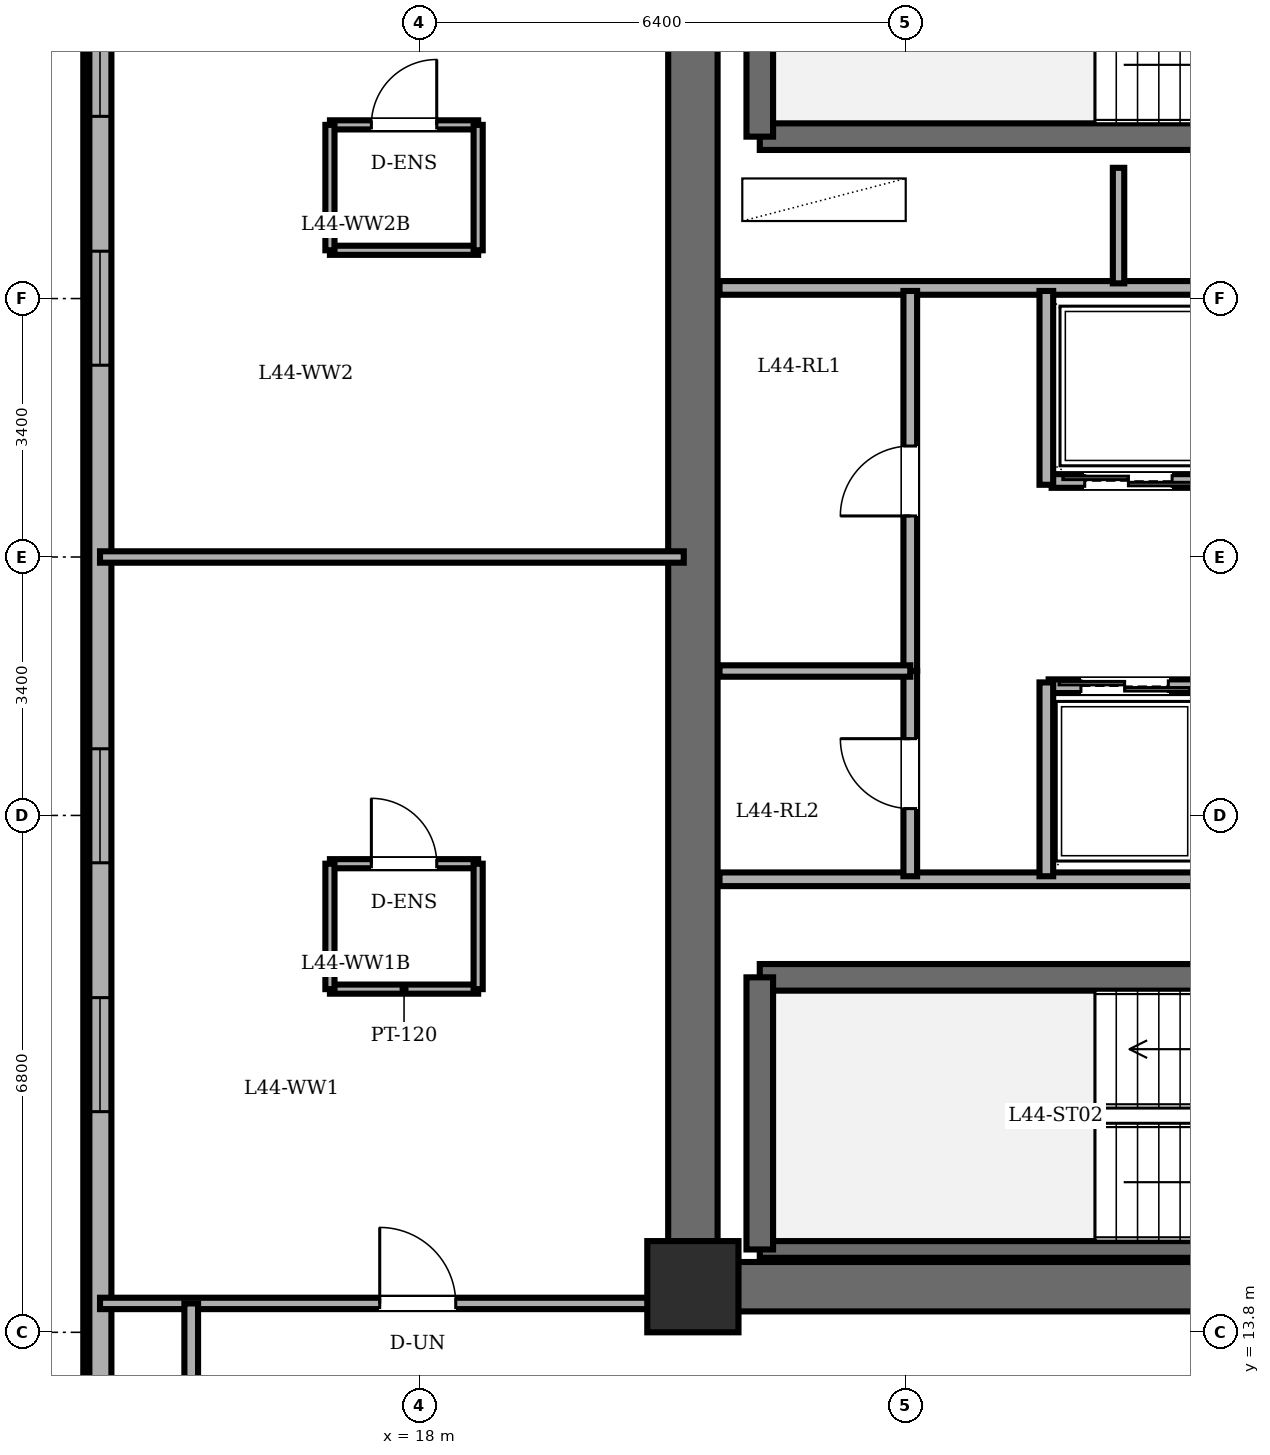
"""IFC4 building model, lengths in metres.
Left out: names, types, materials, properties, quantities, classifications, styles, units other than length and angle.
Written with IfcOpenShell. Run it as: python <this file> out.ifc"""

import sys

from ifc_helpers import new_model, si_unit, direction, frame, frame_2d, origin, origin_2d, place, context, subcontext, project, spatial, rectangle, extrude, element, fill, save


model = new_model("IFC4")
c1 = context("Model", 3, precision=1e-05, world=origin(), true_north=direction((0.0, 1.0)))
c2 = subcontext(c1, "Body", "Model", "MODEL_VIEW")
j1 = project(units=[si_unit("LENGTHUNIT", "METRE"), si_unit("PLANEANGLEUNIT", "RADIAN")], contexts=[c1])
p1 = place(None, origin())
s1 = spatial("IfcSite", under=j1, at=p1, CompositionType="ELEMENT")
p2 = place(p1, origin())
s2 = spatial("IfcBuilding", under=s1, at=p2, CompositionType="ELEMENT")
p3 = place(p2, frame((0.0, 0.0, 169.0)))
s3 = spatial("IfcBuildingStorey", under=s2, at=p3, CompositionType="ELEMENT", Elevation=169.0)
p4 = place(p3, frame((21.6, 14.4, 0.0), z_axis=(0.0, 0.0, 1.0), x_axis=(1.0, 0.0, 0.0)))
e1 = element("IfcColumn", 1, at=p4, inside=s3, PredefinedType="COLUMN", context=c2, shape_type="SweptSolid", body=[
    extrude(rectangle(XDim=1.2, YDim=1.2, at=origin_2d()), origin(), (0.0, 0.0, 1.0), 3.6),
])
p5 = place(p3, frame((13.8, 36.3, 0.0), z_axis=(0.0, 0.0, 1.0), x_axis=(0.0, -1.0, 0.0)))
e2 = element("IfcWall", 2, at=p5, inside=s3, PredefinedType="SOLIDWALL", context=c2, shape_type="SweptSolid", body=[
    extrude(rectangle(XDim=24.6, YDim=0.3, at=frame_2d((12.3, 0.0))), origin(), (0.0, 0.0, 1.0), 3.4),
])
p6 = place(p5, frame((5.003, 0.0, 0.85)))
e3 = element("IfcOpeningElement", 3, at=p6, cuts=e2, PredefinedType="OPENING", context=c2, shape_type="SweptSolid", body=[
    extrude(rectangle(XDim=1.5, YDim=1.55, at=frame_2d((0.75, 0.775))), frame((0.0, 0.16, 0.0), z_axis=(0.0, -1.0, 0.0), x_axis=(1.0, 0.0, 0.0)), (0.0, 0.0, 1.0), 0.32),
])
p7 = place(p5, frame((8.277, 0.0, 0.85)))
e4 = element("IfcOpeningElement", 4, at=p7, cuts=e2, PredefinedType="OPENING", context=c2, shape_type="SweptSolid", body=[
    extrude(rectangle(XDim=1.5, YDim=1.55, at=frame_2d((0.75, 0.775))), frame((0.0, 0.16, 0.0), z_axis=(0.0, -1.0, 0.0), x_axis=(1.0, 0.0, 0.0)), (0.0, 0.0, 1.0), 0.32),
])
p8 = place(p5, frame((14.823, 0.0, 0.85)))
e5 = element("IfcOpeningElement", 5, at=p8, cuts=e2, PredefinedType="OPENING", context=c2, shape_type="SweptSolid", body=[
    extrude(rectangle(XDim=1.5, YDim=1.55, at=frame_2d((0.75, 0.775))), frame((0.0, 0.16, 0.0), z_axis=(0.0, -1.0, 0.0), x_axis=(1.0, 0.0, 0.0)), (0.0, 0.0, 1.0), 0.32),
])
p9 = place(p5, frame((18.097, 0.0, 0.85)))
e6 = element("IfcOpeningElement", 6, at=p9, cuts=e2, PredefinedType="OPENING", context=c2, shape_type="SweptSolid", body=[
    extrude(rectangle(XDim=1.5, YDim=1.55, at=frame_2d((0.75, 0.775))), frame((0.0, 0.16, 0.0), z_axis=(0.0, -1.0, 0.0), x_axis=(1.0, 0.0, 0.0)), (0.0, 0.0, 1.0), 0.32),
])
p10 = place(p3, frame((21.6, 14.4, 0.0), z_axis=(0.0, 0.0, 1.0), x_axis=(0.0, 1.0, 0.0)))
e7 = element("IfcWall", 7, at=p10, inside=s3, PredefinedType="SHEAR", context=c2, shape_type="SweptSolid", body=[
    extrude(rectangle(XDim=19.2, YDim=0.65, at=frame_2d((9.6, 0.0))), origin(), (0.0, 0.0, 1.0), 3.4),
])
p11 = place(p3, frame((37.2, 14.4, 0.0), z_axis=(0.0, 0.0, 1.0), x_axis=(-1.0, 0.0, 0.0)))
e8 = element("IfcWall", 8, at=p11, inside=s3, PredefinedType="SHEAR", context=c2, shape_type="SweptSolid", body=[
    extrude(rectangle(XDim=15.6, YDim=0.65, at=frame_2d((7.8, 0.0))), origin(), (0.0, 0.0, 1.0), 3.4),
])
p12 = place(p3, frame((22.48, 29.53, 0.0), z_axis=(0.0, 0.0, 1.0), x_axis=(1.0, 0.0, 0.0)))
e9 = element("IfcWall", 9, at=p12, inside=s3, PredefinedType="SOLIDWALL", context=c2, shape_type="SweptSolid", body=[
    extrude(rectangle(XDim=7.79, YDim=0.35, at=frame_2d((3.895, 0.0))), origin(), (0.0, 0.0, 1.0), 3.4),
])
p13 = place(p3, frame((22.48, 29.53, 0.0), z_axis=(0.0, 0.0, 1.0), x_axis=(0.0, 1.0, 0.0)))
e10 = element("IfcWall", 10, at=p13, inside=s3, PredefinedType="SOLIDWALL", context=c2, shape_type="SweptSolid", body=[
    extrude(rectangle(XDim=3.58, YDim=0.35, at=frame_2d((1.79, 0.0))), origin(), (0.0, 0.0, 1.0), 3.4),
])
p14 = place(p3, frame((22.48, 18.47, 0.0), z_axis=(0.0, 0.0, 1.0), x_axis=(1.0, 0.0, 0.0)))
e11 = element("IfcWall", 11, at=p14, inside=s3, PredefinedType="SOLIDWALL", context=c2, shape_type="SweptSolid", body=[
    extrude(rectangle(XDim=7.79, YDim=0.35, at=frame_2d((3.895, 0.0))), origin(), (0.0, 0.0, 1.0), 3.4),
])
p15 = place(p3, frame((22.48, 14.89, 0.0), z_axis=(0.0, 0.0, 1.0), x_axis=(1.0, 0.0, 0.0)))
e12 = element("IfcWall", 12, at=p15, inside=s3, PredefinedType="PARTITIONING", context=c2, shape_type="SweptSolid", body=[
    extrude(rectangle(XDim=7.79, YDim=0.22, at=frame_2d((3.895, 0.0))), origin(), (0.0, 0.0, 1.0), 3.4),
])
p16 = place(p3, frame((22.48, 14.89, 0.0), z_axis=(0.0, 0.0, 1.0), x_axis=(0.0, 1.0, 0.0)))
e13 = element("IfcWall", 13, at=p16, inside=s3, PredefinedType="SOLIDWALL", context=c2, shape_type="SweptSolid", body=[
    extrude(rectangle(XDim=3.58, YDim=0.35, at=frame_2d((1.79, 0.0))), origin(), (0.0, 0.0, 1.0), 3.4),
])
p17 = place(p3, frame((21.95, 27.54, 0.0), z_axis=(0.0, 0.0, 1.0), x_axis=(1.0, 0.0, 0.0)))
e14 = element("IfcWall", 14, at=p17, inside=s3, PredefinedType="PARTITIONING", context=c2, shape_type="SweptSolid", body=[
    extrude(rectangle(XDim=10.56, YDim=0.18, at=frame_2d((5.28, 0.0))), origin(), (0.0, 0.0, 1.0), 3.4),
])
p18 = place(p3, frame((27.2, 27.6, 0.0), z_axis=(0.0, 0.0, 1.0), x_axis=(0.0, 1.0, 0.0)))
e15 = element("IfcWall", 15, at=p18, inside=s3, PredefinedType="PARTITIONING", context=c2, shape_type="SweptSolid", body=[
    extrude(rectangle(XDim=1.52, YDim=0.15, at=frame_2d((0.76, 0.0))), origin(), (0.0, 0.0, 1.0), 3.4),
])
p19 = place(p3, frame((21.95, 19.76, 0.0), z_axis=(0.0, 0.0, 1.0), x_axis=(1.0, 0.0, 0.0)))
e16 = element("IfcWall", 16, at=p19, inside=s3, PredefinedType="PARTITIONING", context=c2, shape_type="SweptSolid", body=[
    extrude(rectangle(XDim=14.87, YDim=0.18, at=frame_2d((7.435, 0.0))), origin(), (0.0, 0.0, 1.0), 3.4),
])
p20 = place(p3, frame((28.34, 25.0, 0.0), z_axis=(0.0, 0.0, 1.0), x_axis=(-1.0, 0.0, 0.0)))
e17 = element("IfcWall", 17, at=p20, inside=s3, PredefinedType="PARTITIONING", context=c2, shape_type="SweptSolid", body=[
    extrude(rectangle(XDim=2.02, YDim=0.18, at=frame_2d((1.01, 0.0))), origin(), (0.0, 0.0, 1.0), 3.4),
])
p21 = place(p20, frame((0.435, 0.0, 0.0)))
e18 = element("IfcOpeningElement", 18, at=p21, cuts=e17, PredefinedType="OPENING", context=c2, shape_type="SweptSolid", body=[
    extrude(rectangle(XDim=1.15, YDim=2.2, at=frame_2d((0.575, 1.1))), frame((0.0, 0.1, 0.0), z_axis=(0.0, -1.0, 0.0), x_axis=(1.0, 0.0, 0.0)), (0.0, 0.0, 1.0), 0.2),
])
p22 = place(p3, frame((26.28, 22.3, 0.0), z_axis=(0.0, 0.0, 1.0), x_axis=(1.0, 0.0, 0.0)))
e19 = element("IfcWall", 19, at=p22, inside=s3, PredefinedType="PARTITIONING", context=c2, shape_type="SweptSolid", body=[
    extrude(rectangle(XDim=2.0, YDim=0.18, at=frame_2d((1.0, 0.0))), origin(), (0.0, 0.0, 1.0), 3.4),
])
p23 = place(p22, frame((0.425, 0.0, 0.0)))
e20 = element("IfcOpeningElement", 20, at=p23, cuts=e19, PredefinedType="OPENING", context=c2, shape_type="SweptSolid", body=[
    extrude(rectangle(XDim=1.15, YDim=2.2, at=frame_2d((0.575, 1.1))), frame((0.0, 0.1, 0.0), z_axis=(0.0, -1.0, 0.0), x_axis=(1.0, 0.0, 0.0)), (0.0, 0.0, 1.0), 0.2),
])
p24 = place(p3, frame((24.46, 22.5, 0.0), z_axis=(0.0, 0.0, 1.0), x_axis=(0.0, 1.0, 0.0)))
e21 = element("IfcWall", 21, at=p24, inside=s3, PredefinedType="PARTITIONING", context=c2, shape_type="SweptSolid", body=[
    extrude(rectangle(XDim=5.0, YDim=0.18, at=frame_2d((2.5, 0.0))), origin(), (0.0, 0.0, 1.0), 3.4),
])
p25 = place(p24, frame((2.04, 0.0, 0.0)))
e22 = element("IfcOpeningElement", 22, at=p25, cuts=e21, PredefinedType="OPENING", context=c2, shape_type="SweptSolid", body=[
    extrude(rectangle(XDim=0.92, YDim=2.1, at=frame_2d((0.46, 1.05))), frame((0.0, 0.1, 0.0), z_axis=(0.0, -1.0, 0.0), x_axis=(1.0, 0.0, 0.0)), (0.0, 0.0, 1.0), 0.2),
])
p26 = place(p3, frame((24.46, 19.8, 0.0), z_axis=(0.0, 0.0, 1.0), x_axis=(0.0, 1.0, 0.0)))
e23 = element("IfcWall", 23, at=p26, inside=s3, PredefinedType="PARTITIONING", context=c2, shape_type="SweptSolid", body=[
    extrude(rectangle(XDim=2.7, YDim=0.18, at=frame_2d((1.35, 0.0))), origin(), (0.0, 0.0, 1.0), 3.4),
])
p27 = place(p26, frame((0.89, 0.0, 0.0)))
e24 = element("IfcOpeningElement", 24, at=p27, cuts=e23, PredefinedType="OPENING", context=c2, shape_type="SweptSolid", body=[
    extrude(rectangle(XDim=0.92, YDim=2.1, at=frame_2d((0.46, 1.05))), frame((0.0, 0.1, 0.0), z_axis=(0.0, -1.0, 0.0), x_axis=(1.0, 0.0, 0.0)), (0.0, 0.0, 1.0), 0.2),
])
p28 = place(p3, frame((21.95, 22.5, 0.0), z_axis=(0.0, 0.0, 1.0), x_axis=(1.0, 0.0, 0.0)))
e25 = element("IfcWall", 25, at=p28, inside=s3, PredefinedType="PARTITIONING", context=c2, shape_type="SweptSolid", body=[
    extrude(rectangle(XDim=2.51, YDim=0.15, at=frame_2d((1.255, 0.0))), origin(), (0.0, 0.0, 1.0), 3.4),
])
for number, where, z_axis, x_axis in (
    (26, (26.25, 24.95, 0.0), (0.0, 0.0, 1.0), (0.0, 1.0, 0.0)),
    (27, (26.25, 19.8, 0.0), (0.0, 0.0, 1.0), (0.0, 1.0, 0.0)),
):
    element("IfcWall", number, at=place(p3, frame(where, z_axis=z_axis, x_axis=x_axis)), inside=s3, PredefinedType="PARTITIONING", context=c2, shape_type="SweptSolid", body=[
        extrude(rectangle(XDim=2.55, YDim=0.18, at=frame_2d((1.275, 0.0))), origin(), (0.0, 0.0, 1.0), 3.4),
    ])
p29 = place(p3, frame((16.825, 19.965, 0.0), z_axis=(0.0, 0.0, 1.0), x_axis=(1.0, 0.0, 0.0)))
e28 = element("IfcWall", 28, at=p29, inside=s3, PredefinedType="PARTITIONING", context=c2, shape_type="SweptSolid", body=[
    extrude(rectangle(XDim=1.95, YDim=0.12, at=frame_2d((0.975, 0.0))), origin(), (0.0, 0.0, 1.0), 3.4),
])
p30 = place(p29, frame((0.545, 0.0, 0.0)))
e29 = element("IfcOpeningElement", 29, at=p30, cuts=e28, PredefinedType="OPENING", context=c2, shape_type="SweptSolid", body=[
    extrude(rectangle(XDim=0.86, YDim=2.1, at=frame_2d((0.43, 1.05))), frame((0.0, 0.07, 0.0), z_axis=(0.0, -1.0, 0.0), x_axis=(1.0, 0.0, 0.0)), (0.0, 0.0, 1.0), 0.14),
])
p31 = place(p3, frame((18.775, 18.315, 0.0), z_axis=(0.0, 0.0, 1.0), x_axis=(-1.0, 0.0, 0.0)))
e30 = element("IfcWall", 30, at=p31, inside=s3, PredefinedType="PARTITIONING", context=c2, shape_type="SweptSolid", body=[
    extrude(rectangle(XDim=1.95, YDim=0.12, at=frame_2d((0.975, 0.0))), origin(), (0.0, 0.0, 1.0), 3.4),
])
for number, where, z_axis, x_axis in (
    (31, (16.825, 19.965, 0.0), (0.0, 0.0, 1.0), (0.0, -1.0, 0.0)),
    (32, (18.775, 18.315, 0.0), (0.0, 0.0, 1.0), (0.0, 1.0, 0.0)),
):
    element("IfcWall", number, at=place(p3, frame(where, z_axis=z_axis, x_axis=x_axis)), inside=s3, PredefinedType="PARTITIONING", context=c2, shape_type="SweptSolid", body=[
        extrude(rectangle(XDim=1.65, YDim=0.12, at=frame_2d((0.825, 0.0))), origin(), (0.0, 0.0, 1.0), 3.4),
    ])
p32 = place(p3, frame((16.825, 29.685, 0.0), z_axis=(0.0, 0.0, 1.0), x_axis=(1.0, 0.0, 0.0)))
e33 = element("IfcWall", 33, at=p32, inside=s3, PredefinedType="PARTITIONING", context=c2, shape_type="SweptSolid", body=[
    extrude(rectangle(XDim=1.95, YDim=0.12, at=frame_2d((0.975, 0.0))), origin(), (0.0, 0.0, 1.0), 3.4),
])
p33 = place(p32, frame((0.545, 0.0, 0.0)))
e34 = element("IfcOpeningElement", 34, at=p33, cuts=e33, PredefinedType="OPENING", context=c2, shape_type="SweptSolid", body=[
    extrude(rectangle(XDim=0.86, YDim=2.1, at=frame_2d((0.43, 1.05))), frame((0.0, 0.07, 0.0), z_axis=(0.0, -1.0, 0.0), x_axis=(1.0, 0.0, 0.0)), (0.0, 0.0, 1.0), 0.14),
])
p34 = place(p3, frame((18.775, 28.035, 0.0), z_axis=(0.0, 0.0, 1.0), x_axis=(-1.0, 0.0, 0.0)))
e35 = element("IfcWall", 35, at=p34, inside=s3, PredefinedType="PARTITIONING", context=c2, shape_type="SweptSolid", body=[
    extrude(rectangle(XDim=1.95, YDim=0.12, at=frame_2d((0.975, 0.0))), origin(), (0.0, 0.0, 1.0), 3.4),
])
for number, where, z_axis, x_axis in (
    (36, (16.825, 29.685, 0.0), (0.0, 0.0, 1.0), (0.0, -1.0, 0.0)),
    (37, (18.775, 28.035, 0.0), (0.0, 0.0, 1.0), (0.0, 1.0, 0.0)),
):
    element("IfcWall", number, at=place(p3, frame(where, z_axis=z_axis, x_axis=x_axis)), inside=s3, PredefinedType="PARTITIONING", context=c2, shape_type="SweptSolid", body=[
        extrude(rectangle(XDim=1.65, YDim=0.12, at=frame_2d((0.825, 0.0))), origin(), (0.0, 0.0, 1.0), 3.4),
    ])
p35 = place(p3, frame((13.8, 14.18, 0.0), z_axis=(0.0, 0.0, 1.0), x_axis=(1.0, 0.0, 0.0)))
e38 = element("IfcWall", 38, at=p35, inside=s3, PredefinedType="PARTITIONING", context=c2, shape_type="SweptSolid", body=[
    extrude(rectangle(XDim=7.68, YDim=0.15, at=frame_2d((3.84, 0.0))), origin(), (0.0, 0.0, 1.0), 3.4),
])
p36 = place(p35, frame((3.68, 0.0, 0.0)))
e39 = element("IfcOpeningElement", 39, at=p36, cuts=e38, PredefinedType="OPENING", context=c2, shape_type="SweptSolid", body=[
    extrude(rectangle(XDim=1.0, YDim=2.15, at=frame_2d((0.5, 1.075))), frame((0.0, 0.085, 0.0), z_axis=(0.0, -1.0, 0.0), x_axis=(1.0, 0.0, 0.0)), (0.0, 0.0, 1.0), 0.17),
])
p37 = place(p3, frame((13.8, 24.0, 0.0), z_axis=(0.0, 0.0, 1.0), x_axis=(1.0, 0.0, 0.0)))
e40 = element("IfcWall", 40, at=p37, inside=s3, PredefinedType="PARTITIONING", context=c2, shape_type="SweptSolid", body=[
    extrude(rectangle(XDim=7.68, YDim=0.15, at=frame_2d((3.84, 0.0))), origin(), (0.0, 0.0, 1.0), 3.4),
])
p38 = place(p3, frame((15.0, 8.487, 0.0), z_axis=(0.0, 0.0, 1.0), x_axis=(0.0, 1.0, 0.0)))
e41 = element("IfcWall", 41, at=p38, inside=s3, PredefinedType="PARTITIONING", context=c2, shape_type="SweptSolid", body=[
    extrude(rectangle(XDim=5.693, YDim=0.18, at=frame_2d((2.846, 0.0))), origin(), (0.0, 0.0, 1.0), 3.4),
])
p39 = place(p6, origin())
e42 = element("IfcWindow", 42, at=p39, inside=s3, PartitioningType="DOUBLE_PANEL_VERTICAL", PredefinedType="WINDOW", context=c2, shape_type="SweptSolid", body=[
    extrude(rectangle(XDim=1.5, YDim=1.55, at=frame_2d((0.75, 0.775))), frame((0.0, 0.03, 0.0), z_axis=(0.0, -1.0, 0.0), x_axis=(1.0, 0.0, 0.0)), (0.0, 0.0, 1.0), 0.06),
])
fill(e3, e42)
p40 = place(p7, origin())
e43 = element("IfcWindow", 43, at=p40, inside=s3, PartitioningType="DOUBLE_PANEL_VERTICAL", PredefinedType="WINDOW", context=c2, shape_type="SweptSolid", body=[
    extrude(rectangle(XDim=1.5, YDim=1.55, at=frame_2d((0.75, 0.775))), frame((0.0, 0.03, 0.0), z_axis=(0.0, -1.0, 0.0), x_axis=(1.0, 0.0, 0.0)), (0.0, 0.0, 1.0), 0.06),
])
fill(e4, e43)
p41 = place(p8, origin())
e44 = element("IfcWindow", 44, at=p41, inside=s3, PartitioningType="DOUBLE_PANEL_VERTICAL", PredefinedType="WINDOW", context=c2, shape_type="SweptSolid", body=[
    extrude(rectangle(XDim=1.5, YDim=1.55, at=frame_2d((0.75, 0.775))), frame((0.0, 0.03, 0.0), z_axis=(0.0, -1.0, 0.0), x_axis=(1.0, 0.0, 0.0)), (0.0, 0.0, 1.0), 0.06),
])
fill(e5, e44)
p42 = place(p9, origin())
e45 = element("IfcWindow", 45, at=p42, inside=s3, PartitioningType="DOUBLE_PANEL_VERTICAL", PredefinedType="WINDOW", context=c2, shape_type="SweptSolid", body=[
    extrude(rectangle(XDim=1.5, YDim=1.55, at=frame_2d((0.75, 0.775))), frame((0.0, 0.03, 0.0), z_axis=(0.0, -1.0, 0.0), x_axis=(1.0, 0.0, 0.0)), (0.0, 0.0, 1.0), 0.06),
])
fill(e6, e45)
p43 = place(p21, origin())
e46 = element("IfcDoor", 46, at=p43, inside=s3, OperationType="DOUBLE_DOOR_SLIDING", PredefinedType="DOOR", context=c2, shape_type="SweptSolid", body=[
    extrude(rectangle(XDim=1.15, YDim=2.2, at=frame_2d((0.575, 1.1))), frame((0.0, 0.025, 0.0), z_axis=(0.0, -1.0, 0.0), x_axis=(1.0, 0.0, 0.0)), (0.0, 0.0, 1.0), 0.05),
])
fill(e18, e46)
p44 = place(p23, origin())
e47 = element("IfcDoor", 47, at=p44, inside=s3, OperationType="DOUBLE_DOOR_SLIDING", PredefinedType="DOOR", context=c2, shape_type="SweptSolid", body=[
    extrude(rectangle(XDim=1.15, YDim=2.2, at=frame_2d((0.575, 1.1))), frame((0.0, 0.025, 0.0), z_axis=(0.0, -1.0, 0.0), x_axis=(1.0, 0.0, 0.0)), (0.0, 0.0, 1.0), 0.05),
])
fill(e20, e47)
p45 = place(p25, origin())
e48 = element("IfcDoor", 48, at=p45, inside=s3, OperationType="SINGLE_SWING_LEFT", PredefinedType="DOOR", context=c2, shape_type="SweptSolid", body=[
    extrude(rectangle(XDim=0.92, YDim=2.1, at=frame_2d((0.46, 1.05))), frame((0.0, 0.025, 0.0), z_axis=(0.0, -1.0, 0.0), x_axis=(1.0, 0.0, 0.0)), (0.0, 0.0, 1.0), 0.05),
])
fill(e22, e48)
p46 = place(p27, origin())
e49 = element("IfcDoor", 49, at=p46, inside=s3, OperationType="SINGLE_SWING_RIGHT", PredefinedType="DOOR", context=c2, shape_type="SweptSolid", body=[
    extrude(rectangle(XDim=0.92, YDim=2.1, at=frame_2d((0.46, 1.05))), frame((0.0, 0.025, 0.0), z_axis=(0.0, -1.0, 0.0), x_axis=(1.0, 0.0, 0.0)), (0.0, 0.0, 1.0), 0.05),
])
fill(e24, e49)
p47 = place(p30, origin())
e50 = element("IfcDoor", 50, at=p47, inside=s3, OperationType="SINGLE_SWING_LEFT", PredefinedType="DOOR", context=c2, shape_type="SweptSolid", body=[
    extrude(rectangle(XDim=0.86, YDim=2.1, at=frame_2d((0.43, 1.05))), frame((0.0, 0.025, 0.0), z_axis=(0.0, -1.0, 0.0), x_axis=(1.0, 0.0, 0.0)), (0.0, 0.0, 1.0), 0.05),
])
fill(e29, e50)
p48 = place(p33, origin())
e51 = element("IfcDoor", 51, at=p48, inside=s3, OperationType="SINGLE_SWING_RIGHT", PredefinedType="DOOR", context=c2, shape_type="SweptSolid", body=[
    extrude(rectangle(XDim=0.86, YDim=2.1, at=frame_2d((0.43, 1.05))), frame((0.0, 0.025, 0.0), z_axis=(0.0, -1.0, 0.0), x_axis=(1.0, 0.0, 0.0)), (0.0, 0.0, 1.0), 0.05),
])
fill(e34, e51)
p49 = place(p36, origin())
e52 = element("IfcDoor", 52, at=p49, inside=s3, OperationType="SINGLE_SWING_LEFT", PredefinedType="DOOR", context=c2, shape_type="SweptSolid", body=[
    extrude(rectangle(XDim=1.0, YDim=2.15, at=frame_2d((0.5, 1.075))), frame((0.0, 0.025, 0.0), z_axis=(0.0, -1.0, 0.0), x_axis=(1.0, 0.0, 0.0)), (0.0, 0.0, 1.0), 0.05),
])
fill(e39, e52)
save(model, sys.argv[1])
